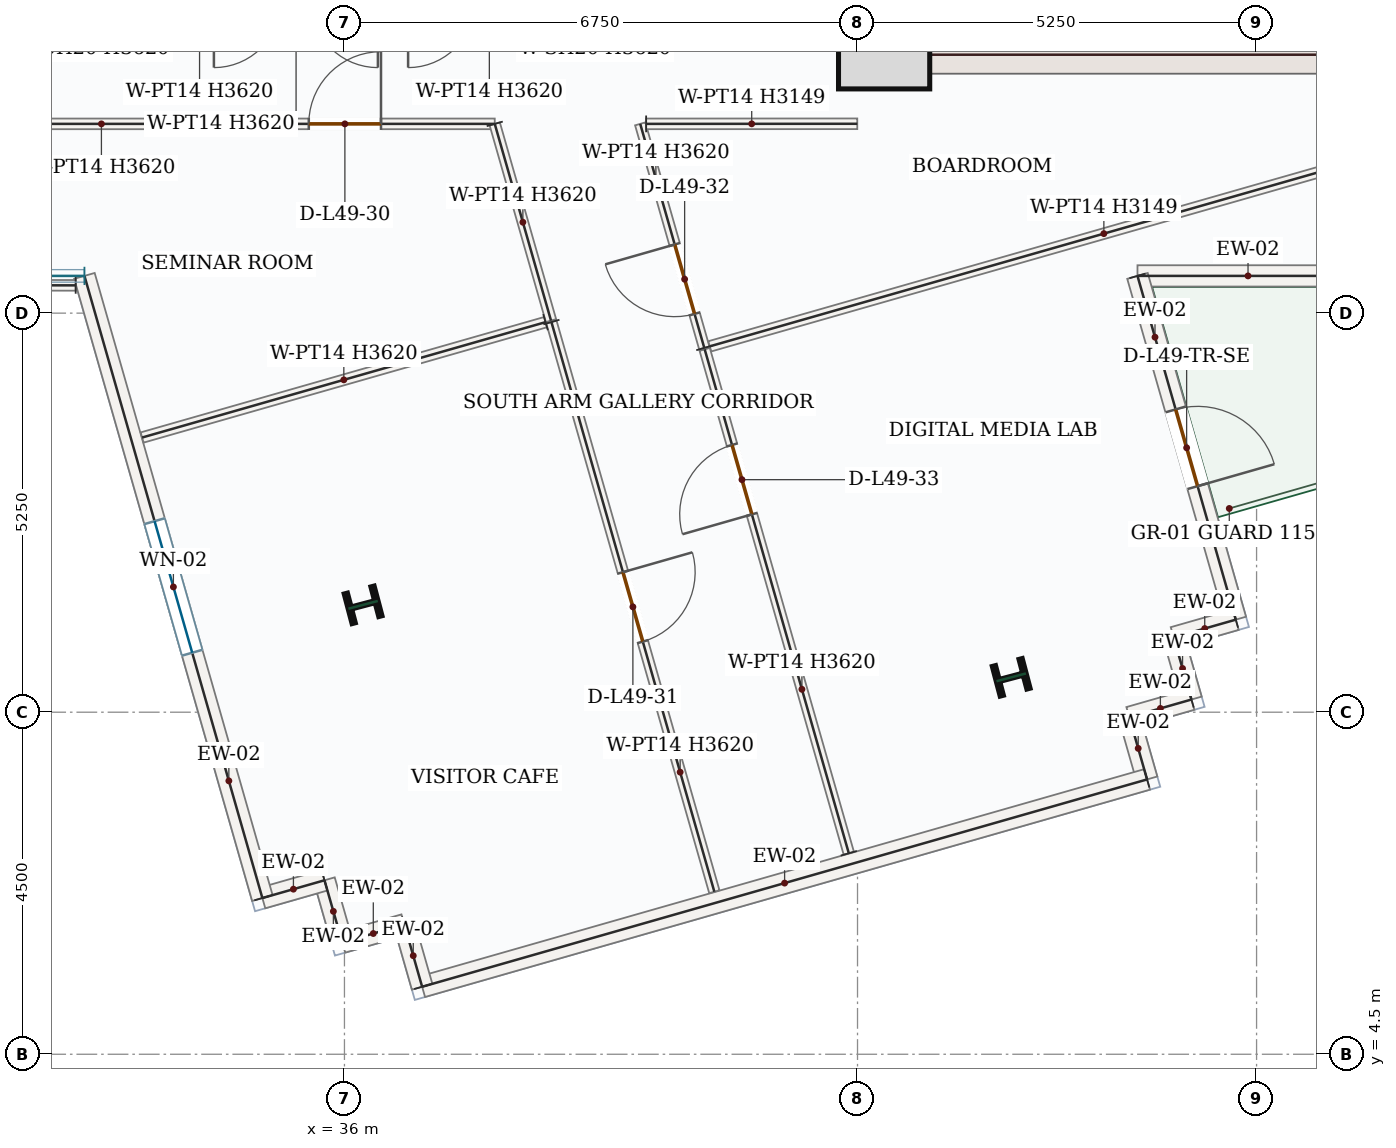
"""IFC4 building model, lengths in metres.
Left out: names, types, materials, properties, quantities, classifications, styles, units other than length and angle.
Written with IfcOpenShell. Run it as: python <this file> out.ifc"""

import sys

from ifc_helpers import new_model, si_unit, direction, frame, frame_2d, origin, origin_2d, place, context, subcontext, project, spatial, rectangle, i_section, extrude, source, transform, mapped, element, fill, save


model = new_model("IFC4")
c1 = context("Model", 3, precision=1e-05, world=origin(), true_north=direction((0.0, 1.0)))
c2 = subcontext(c1, "Body", "Model", "MODEL_VIEW")
j1 = project(units=[si_unit("LENGTHUNIT", "METRE"), si_unit("PLANEANGLEUNIT", "RADIAN")], contexts=[c1])
p1 = place(None, origin())
s1 = spatial("IfcSite", under=j1, at=p1, CompositionType="ELEMENT")
p2 = place(p1, origin())
s2 = spatial("IfcBuilding", under=s1, at=p2, CompositionType="ELEMENT")
p3 = place(p2, frame((0.0, 0.0, 209.7)))
s3 = spatial("IfcBuildingStorey", under=s2, at=p3, CompositionType="ELEMENT", Elevation=209.7)
p4 = place(p3, frame((43.0, 17.4, 0.0), z_axis=(0.0, 0.0, 1.0), x_axis=(0.0, 1.0, 0.0)))
e1 = element("IfcWall", 1, at=p4, inside=s3, PredefinedType="SHEAR", context=c2, shape_type="SweptSolid", body=[
    extrude(rectangle(XDim=8.55, YDim=0.5, at=frame_2d((4.275, 0.0))), origin(), (0.0, 0.0, 1.0), 3.62),
])
p5 = place(p4, frame((6.65, 0.0, 0.0)))
e2 = element("IfcOpeningElement", 2, at=p5, cuts=e1, PredefinedType="OPENING", context=c2, shape_type="SweptSolid", body=[
    extrude(rectangle(XDim=1.1, YDim=2.2, at=frame_2d((0.55, 1.1))), frame((0.0, 0.26, 0.0), z_axis=(0.0, -1.0, 0.0), x_axis=(1.0, 0.0, 0.0)), (0.0, 0.0, 1.0), 0.52),
])
p6 = place(p4, frame((1.75, 0.0, 0.0)))
e3 = element("IfcOpeningElement", 3, at=p6, cuts=e1, PredefinedType="OPENING", context=c2, shape_type="SweptSolid", body=[
    extrude(rectangle(XDim=1.3, YDim=2.2, at=frame_2d((0.65, 1.1))), frame((0.0, 0.26, 0.0), z_axis=(0.0, -1.0, 0.0), x_axis=(1.0, 0.0, 0.0)), (0.0, 0.0, 1.0), 0.52),
])
p7 = place(p4, frame((4.3, 0.0, 0.0)))
e4 = element("IfcOpeningElement", 4, at=p7, cuts=e1, PredefinedType="OPENING", context=c2, shape_type="SweptSolid", body=[
    extrude(rectangle(XDim=0.88, YDim=2.1, at=frame_2d((0.44, 1.05))), frame((0.0, 0.26, 0.0), z_axis=(0.0, -1.0, 0.0), x_axis=(1.0, 0.0, 0.0)), (0.0, 0.0, 1.0), 0.52),
])
m1 = source(origin(), c2, "Body", "SweptSolid", [
    extrude(rectangle(XDim=7.0, YDim=0.5, at=frame_2d((3.5, 0.0))), origin(), (0.0, 0.0, 1.0), 3.62),
])
p8 = place(p3, frame((43.25, 17.65, 0.0), z_axis=(0.0, 0.0, 1.0), x_axis=(1.0, 0.0, 0.0)))
e5 = element("IfcWall", 5, at=p8, inside=s3, PredefinedType="SHEAR", context=c2, shape_type="MappedRepresentation", body=[
    mapped(m1, transform((0.0, 0.0, 0.0), x_axis=(1.0, 0.0, 0.0), y_axis=(0.0, 1.0, 0.0), z_axis=(0.0, 0.0, 1.0), scale=1.0)),
])
m2 = source(origin(), c2, "Body", "SweptSolid", [
    extrude(rectangle(XDim=1.2, YDim=1.2, at=origin_2d()), origin(), (0.0, 0.0, 1.0), 3.9),
])
p9 = place(p3, frame((43.1, 17.8, 0.0), z_axis=(0.0, 0.0, 1.0), x_axis=(1.0, 0.0, 0.0)))
e6 = element("IfcColumn", 6, at=p9, inside=s3, PredefinedType="COLUMN", context=c2, shape_type="MappedRepresentation", body=[
    mapped(m2, transform((0.0, 0.0, 0.0), x_axis=(1.0, 0.0, 0.0), y_axis=(0.0, 1.0, 0.0), z_axis=(0.0, 0.0, 1.0), scale=1.0)),
])
m3 = source(origin(), c2, "Body", "SweptSolid", [
    extrude(i_section(OverallWidth=0.404, OverallDepth=0.407, WebThickness=0.027, FlangeThickness=0.044, FilletRadius=0.018, at=origin_2d()), origin(), (0.0, 0.0, 1.0), 3.9),
])
for number, where, z_axis, x_axis in (
    (7, (36.245, 10.412, 0.0), (0.0, 0.0, 1.0), (-0.255, 0.967, 0.0)),
    (8, (44.772, 9.459, 0.0), (0.0, 0.0, 1.0), (-0.255, 0.967, 0.0)),
):
    element("IfcColumn", number, at=place(p3, frame(where, z_axis=z_axis, x_axis=x_axis)), inside=s3, PredefinedType="COLUMN", context=c2, shape_type="MappedRepresentation", body=[
        mapped(m3, transform((0.0, 0.0, 0.0), x_axis=(1.0, 0.0, 0.0), y_axis=(0.0, 1.0, 0.0), z_axis=(0.0, 0.0, 1.0), scale=1.0)),
    ])
m4 = source(origin(), c2, "Body", "SweptSolid", [
    extrude(rectangle(XDim=2.909, YDim=0.28, at=frame_2d((1.455, 0.0))), origin(), (0.0, 0.0, 1.0), 3.62),
])
p10 = place(p3, frame((49.342, 14.74, 0.0), z_axis=(0.0, 0.0, 1.0), x_axis=(-1.0, 0.0, 0.0)))
e9 = element("IfcWall", 9, at=p10, inside=s3, PredefinedType="SOLIDWALL", context=c2, shape_type="MappedRepresentation", body=[
    mapped(m4, transform((0.0, 0.0, 0.0), x_axis=(1.0, 0.0, 0.0), y_axis=(0.0, 1.0, 0.0), z_axis=(0.0, 0.0, 1.0), scale=1.0)),
])
p11 = place(p3, frame((46.433, 14.74, 0.0), z_axis=(0.0, 0.0, 1.0), x_axis=(0.274981611661, -0.961449485542, 0.0)))
e10 = element("IfcWall", 10, at=p11, inside=s3, PredefinedType="SOLIDWALL", context=c2, shape_type="SweptSolid", body=[
    extrude(rectangle(XDim=4.704, YDim=0.28, at=frame_2d((2.352, 0.0))), origin(), (0.0, 0.0, 1.0), 3.62),
])
p12 = place(p11, frame((1.827, 0.0, 0.0)))
e11 = element("IfcOpeningElement", 11, at=p12, cuts=e10, PredefinedType="OPENING", context=c2, shape_type="SweptSolid", body=[
    extrude(rectangle(XDim=1.05, YDim=2.15, at=frame_2d((0.525, 1.075))), frame((0.0, 0.15, 0.0), z_axis=(0.0, -1.0, 0.0), x_axis=(1.0, 0.0, 0.0)), (0.0, 0.0, 1.0), 0.3),
])
m5 = source(origin(), c2, "Body", "SweptSolid", [
    extrude(rectangle(XDim=0.85, YDim=0.28, at=frame_2d((0.425, 0.0))), origin(), (0.0, 0.0, 1.0), 3.62),
])
p13 = place(p3, frame((47.727, 10.218, 0.0), z_axis=(0.0, 0.0, 1.0), x_axis=(-0.961469728335, -0.274910824624, 0.0)))
e12 = element("IfcWall", 12, at=p13, inside=s3, PredefinedType="SOLIDWALL", context=c2, shape_type="MappedRepresentation", body=[
    mapped(m5, transform((0.0, 0.0, 0.0), x_axis=(1.0, 0.0, 0.0), y_axis=(0.0, 1.0, 0.0), z_axis=(0.0, 0.0, 1.0), scale=1.0)),
])
m6 = source(origin(), c2, "Body", "SweptSolid", [
    extrude(rectangle(XDim=0.85, YDim=0.28, at=frame_2d((0.425, 0.0))), origin(), (0.0, 0.0, 1.0), 3.62),
])
p14 = place(p3, frame((46.909, 9.984, 0.0), z_axis=(0.0, 0.0, 1.0), x_axis=(0.274834915789, -0.961491429532, 0.0)))
e13 = element("IfcWall", 13, at=p14, inside=s3, PredefinedType="SOLIDWALL", context=c2, shape_type="MappedRepresentation", body=[
    mapped(m6, transform((0.0, 0.0, 0.0), x_axis=(1.0, 0.0, 0.0), y_axis=(0.0, 1.0, 0.0), z_axis=(0.0, 0.0, 1.0), scale=1.0)),
])
p15 = place(p3, frame((47.143, 9.167, 0.0), z_axis=(0.0, 0.0, 1.0), x_axis=(-0.961469728335, -0.274910824624, 0.0)))
e14 = element("IfcWall", 14, at=p15, inside=s3, PredefinedType="SOLIDWALL", context=c2, shape_type="MappedRepresentation", body=[
    mapped(m5, transform((0.0, 0.0, 0.0), x_axis=(1.0, 0.0, 0.0), y_axis=(0.0, 1.0, 0.0), z_axis=(0.0, 0.0, 1.0), scale=1.0)),
])
p16 = place(p3, frame((46.326, 8.933, 0.0), z_axis=(0.0, 0.0, 1.0), x_axis=(0.274834915789, -0.961491429532, 0.0)))
e15 = element("IfcWall", 15, at=p16, inside=s3, PredefinedType="SOLIDWALL", context=c2, shape_type="MappedRepresentation", body=[
    mapped(m6, transform((0.0, 0.0, 0.0), x_axis=(1.0, 0.0, 0.0), y_axis=(0.0, 1.0, 0.0), z_axis=(0.0, 0.0, 1.0), scale=1.0)),
])
m7 = source(origin(), c2, "Body", "SweptSolid", [
    extrude(rectangle(XDim=9.92, YDim=0.28, at=frame_2d((4.96, 0.0))), origin(), (0.0, 0.0, 1.0), 3.62),
])
p17 = place(p3, frame((46.56, 8.115, 0.0), z_axis=(0.0, 0.0, 1.0), x_axis=(-0.961457051276, -0.274955157346, 0.0)))
e16 = element("IfcWall", 16, at=p17, inside=s3, PredefinedType="SOLIDWALL", context=c2, shape_type="MappedRepresentation", body=[
    mapped(m7, transform((0.0, 0.0, 0.0), x_axis=(1.0, 0.0, 0.0), y_axis=(0.0, 1.0, 0.0), z_axis=(0.0, 0.0, 1.0), scale=1.0)),
])
for number, where, z_axis, x_axis in (
    (17, (37.022, 5.388, 0.0), (0.0, 0.0, 1.0), (-0.275, 0.961, 0.0)),
    (18, (36.788, 6.205, 0.0), (0.0, 0.0, 1.0), (-0.961, -0.275, 0.0)),
):
    element("IfcWall", number, at=place(p3, frame(where, z_axis=z_axis, x_axis=x_axis)), inside=s3, PredefinedType="SOLIDWALL", context=c2, shape_type="MappedRepresentation", body=[
        mapped(m5, transform((0.0, 0.0, 0.0), x_axis=(1.0, 0.0, 0.0), y_axis=(0.0, 1.0, 0.0), z_axis=(0.0, 0.0, 1.0), scale=1.0)),
    ])
p18 = place(p3, frame((35.971, 5.971, 0.0), z_axis=(0.0, 0.0, 1.0), x_axis=(-0.274834915789, 0.961491429532, 0.0)))
e19 = element("IfcWall", 19, at=p18, inside=s3, PredefinedType="SOLIDWALL", context=c2, shape_type="MappedRepresentation", body=[
    mapped(m6, transform((0.0, 0.0, 0.0), x_axis=(1.0, 0.0, 0.0), y_axis=(0.0, 1.0, 0.0), z_axis=(0.0, 0.0, 1.0), scale=1.0)),
])
p19 = place(p3, frame((35.737, 6.789, 0.0), z_axis=(0.0, 0.0, 1.0), x_axis=(-0.961393768724, -0.275176346112, 0.0)))
e20 = element("IfcWall", 20, at=p19, inside=s3, PredefinedType="SOLIDWALL", context=c2, shape_type="MappedRepresentation", body=[
    mapped(m5, transform((0.0, 0.0, 0.0), x_axis=(1.0, 0.0, 0.0), y_axis=(0.0, 1.0, 0.0), z_axis=(0.0, 0.0, 1.0), scale=1.0)),
])
p20 = place(p3, frame((34.92, 6.555, 0.0), z_axis=(0.0, 0.0, 1.0), x_axis=(-0.27496352843, 0.961454657295, 0.0)))
e21 = element("IfcWall", 21, at=p20, inside=s3, PredefinedType="SOLIDWALL", context=c2, shape_type="SweptSolid", body=[
    extrude(rectangle(XDim=8.513, YDim=0.28, at=frame_2d((4.257, 0.0))), origin(), (0.0, 0.0, 1.0), 3.62),
])
p21 = place(p20, frame((3.357, 0.0, 0.85)))
e22 = element("IfcOpeningElement", 22, at=p21, cuts=e21, PredefinedType="OPENING", context=c2, shape_type="SweptSolid", body=[
    extrude(rectangle(XDim=1.8, YDim=1.75, at=frame_2d((0.9, 0.875))), frame((0.0, 0.15, 0.0), z_axis=(0.0, -1.0, 0.0), x_axis=(1.0, 0.0, 0.0)), (0.0, 0.0, 1.0), 0.3),
])
p22 = place(p3, frame((40.734, 13.792, 0.0), z_axis=(0.0, 0.0, 1.0), x_axis=(-0.274984067599, 0.961448783122, 0.0)))
e23 = element("IfcWall", 23, at=p22, inside=s3, PredefinedType="PARTITIONING", context=c2, shape_type="SweptSolid", body=[
    extrude(rectangle(XDim=3.066, YDim=0.14, at=frame_2d((1.533, 0.0))), origin(), (0.0, 0.0, 1.0), 3.62),
])
p23 = place(p22, frame((0.465, 0.0, 0.0)))
e24 = element("IfcOpeningElement", 24, at=p23, cuts=e23, PredefinedType="OPENING", context=c2, shape_type="SweptSolid", body=[
    extrude(rectangle(XDim=0.95, YDim=2.15, at=frame_2d((0.475, 1.075))), frame((0.0, 0.08, 0.0), z_axis=(0.0, -1.0, 0.0), x_axis=(1.0, 0.0, 0.0)), (0.0, 0.0, 1.0), 0.16),
])
m8 = source(origin(), c2, "Body", "SweptSolid", [
    extrude(rectangle(XDim=2.778, YDim=0.14, at=frame_2d((1.389, 0.0))), origin(), (0.0, 0.0, 1.0), 3.149),
])
p24 = place(p3, frame((39.969, 16.74, 0.0), z_axis=(0.0, 0.0, 1.0), x_axis=(0.999999903427, 0.000439483125, 0.0)))
e25 = element("IfcWall", 25, at=p24, inside=s3, PredefinedType="PARTITIONING", context=c2, shape_type="MappedRepresentation", body=[
    mapped(m8, transform((0.0, 0.0, 0.0), x_axis=(1.0, 0.0, 0.0), y_axis=(0.0, 1.0, 0.0), z_axis=(0.0, 0.0, 1.0), scale=1.0)),
])
m9 = source(origin(), c2, "Body", "SweptSolid", [
    extrude(rectangle(XDim=10.785, YDim=0.14, at=frame_2d((5.393, 0.0))), origin(), (0.0, 0.0, 1.0), 3.149),
])
p25 = place(p3, frame((51.176, 16.779, 0.0), z_axis=(0.0, 0.0, 1.0), x_axis=(-0.961454726908, -0.274963285016, 0.0)))
e26 = element("IfcWall", 26, at=p25, inside=s3, PredefinedType="PARTITIONING", context=c2, shape_type="MappedRepresentation", body=[
    mapped(m9, transform((0.0, 0.0, 0.0), x_axis=(1.0, 0.0, 0.0), y_axis=(0.0, 1.0, 0.0), z_axis=(0.0, 0.0, 1.0), scale=1.0)),
])
p26 = place(p3, frame((30.225, 16.74, 0.0), z_axis=(0.0, 0.0, 1.0), x_axis=(1.0, 0.0, 0.0)))
e27 = element("IfcWall", 27, at=p26, inside=s3, PredefinedType="PARTITIONING", context=c2, shape_type="SweptSolid", body=[
    extrude(rectangle(XDim=7.753, YDim=0.14, at=frame_2d((3.876, 0.0))), origin(), (0.0, 0.0, 1.0), 3.62),
])
p27 = place(p26, frame((5.306, 0.0, 0.0)))
e28 = element("IfcOpeningElement", 28, at=p27, cuts=e27, PredefinedType="OPENING", context=c2, shape_type="SweptSolid", body=[
    extrude(rectangle(XDim=0.95, YDim=2.15, at=frame_2d((0.475, 1.075))), frame((0.0, 0.08, 0.0), z_axis=(0.0, -1.0, 0.0), x_axis=(1.0, 0.0, 0.0)), (0.0, 0.0, 1.0), 0.16),
])
m10 = source(origin(), c2, "Body", "SweptSolid", [
    extrude(rectangle(XDim=2.692, YDim=0.14, at=frame_2d((1.346, 0.0))), origin(), (0.0, 0.0, 1.0), 3.62),
])
p28 = place(p3, frame((37.977, 16.74, 0.0), z_axis=(0.0, 0.0, 1.0), x_axis=(0.27500862401, -0.961441759401, 0.0)))
e29 = element("IfcWall", 29, at=p28, inside=s3, PredefinedType="PARTITIONING", context=c2, shape_type="MappedRepresentation", body=[
    mapped(m10, transform((0.0, 0.0, 0.0), x_axis=(1.0, 0.0, 0.0), y_axis=(0.0, 1.0, 0.0), z_axis=(0.0, 0.0, 1.0), scale=1.0)),
])
m11 = source(origin(), c2, "Body", "SweptSolid", [
    extrude(rectangle(XDim=5.52, YDim=0.14, at=frame_2d((2.76, 0.0))), origin(), (0.0, 0.0, 1.0), 3.62),
])
p29 = place(p3, frame((38.646, 14.131, 0.0), z_axis=(0.0, 0.0, 1.0), x_axis=(-0.961455490798, -0.274960613933, 0.0)))
e30 = element("IfcWall", 30, at=p29, inside=s3, PredefinedType="PARTITIONING", context=c2, shape_type="MappedRepresentation", body=[
    mapped(m11, transform((0.0, 0.0, 0.0), x_axis=(1.0, 0.0, 0.0), y_axis=(0.0, 1.0, 0.0), z_axis=(0.0, 0.0, 1.0), scale=1.0)),
])
m12 = source(origin(), c2, "Body", "SweptSolid", [
    extrude(rectangle(XDim=3.385, YDim=0.14, at=frame_2d((1.693, 0.0))), origin(), (0.0, 0.0, 1.0), 3.62),
])
p30 = place(p3, frame((32.464, 14.615, 0.0), z_axis=(0.0, 0.0, 1.0), x_axis=(-0.999999061333, 0.001370158085, 0.0)))
e31 = element("IfcWall", 31, at=p30, inside=s3, PredefinedType="PARTITIONING", context=c2, shape_type="MappedRepresentation", body=[
    mapped(m12, transform((0.0, 0.0, 0.0), x_axis=(1.0, 0.0, 0.0), y_axis=(0.0, 1.0, 0.0), z_axis=(0.0, 0.0, 1.0), scale=1.0)),
])
p31 = place(p3, frame((42.635, 7.144, 0.0), z_axis=(0.0, 0.0, 1.0), x_axis=(-0.274973646468, 0.96145176361, 0.0)))
e32 = element("IfcWall", 32, at=p31, inside=s3, PredefinedType="PARTITIONING", context=c2, shape_type="SweptSolid", body=[
    extrude(rectangle(XDim=6.895, YDim=0.14, at=frame_2d((3.448, 0.0))), origin(), (0.0, 0.0, 1.0), 3.62),
])
p32 = place(p31, frame((4.637, 0.0, 0.0)))
e33 = element("IfcOpeningElement", 33, at=p32, cuts=e32, PredefinedType="OPENING", context=c2, shape_type="SweptSolid", body=[
    extrude(rectangle(XDim=0.95, YDim=2.15, at=frame_2d((0.475, 1.075))), frame((0.0, 0.08, 0.0), z_axis=(0.0, -1.0, 0.0), x_axis=(1.0, 0.0, 0.0)), (0.0, 0.0, 1.0), 0.16),
])
p33 = place(p3, frame((38.723, 14.133, 0.0), z_axis=(0.0, 0.0, 1.0), x_axis=(0.274985856522, -0.96144827147, 0.0)))
e34 = element("IfcWall", 34, at=p33, inside=s3, PredefinedType="PARTITIONING", context=c2, shape_type="SweptSolid", body=[
    extrude(rectangle(XDim=7.795, YDim=0.14, at=frame_2d((3.897, 0.0))), origin(), (0.0, 0.0, 1.0), 3.62),
])
p34 = place(p33, frame((3.423, 0.0, 0.0)))
e35 = element("IfcOpeningElement", 35, at=p34, cuts=e34, PredefinedType="OPENING", context=c2, shape_type="SweptSolid", body=[
    extrude(rectangle(XDim=0.95, YDim=2.15, at=frame_2d((0.475, 1.075))), frame((0.0, 0.08, 0.0), z_axis=(0.0, -1.0, 0.0), x_axis=(1.0, 0.0, 0.0)), (0.0, 0.0, 1.0), 0.16),
])
m13 = source(origin(), c2, "Body", "SweptSolid", [
    extrude(rectangle(XDim=1.05, YDim=2.15, at=frame_2d((0.525, 1.075))), frame((0.0, 0.025, 0.0), z_axis=(0.0, -1.0, 0.0), x_axis=(1.0, 0.0, 0.0)), (0.0, 0.0, 1.0), 0.05),
])
p35 = place(p12, origin())
e36 = element("IfcDoor", 36, at=p35, inside=s3, OperationType="SINGLE_SWING_RIGHT", PredefinedType="DOOR", context=c2, shape_type="MappedRepresentation", body=[
    mapped(m13, transform((0.0, 0.0, 0.0), x_axis=(1.0, 0.0, 0.0), y_axis=(0.0, 1.0, 0.0), z_axis=(0.0, 0.0, 1.0), scale=1.0)),
])
fill(e11, e36)
m14 = source(origin(), c2, "Body", "SweptSolid", [
    extrude(rectangle(XDim=1.8, YDim=1.75, at=frame_2d((0.9, 0.875))), frame((0.0, 0.03, 0.0), z_axis=(0.0, -1.0, 0.0), x_axis=(1.0, 0.0, 0.0)), (0.0, 0.0, 1.0), 0.06),
])
p36 = place(p21, origin())
e37 = element("IfcWindow", 37, at=p36, inside=s3, PartitioningType="DOUBLE_PANEL_VERTICAL", PredefinedType="WINDOW", context=c2, shape_type="MappedRepresentation", body=[
    mapped(m14, transform((0.0, 0.0, 0.0), x_axis=(1.0, 0.0, 0.0), y_axis=(0.0, 1.0, 0.0), z_axis=(0.0, 0.0, 1.0), scale=1.0)),
])
fill(e22, e37)
m15 = source(origin(), c2, "Body", "SweptSolid", [
    extrude(rectangle(XDim=0.95, YDim=2.15, at=frame_2d((0.475, 1.075))), frame((0.0, 0.025, 0.0), z_axis=(0.0, -1.0, 0.0), x_axis=(1.0, 0.0, 0.0)), (0.0, 0.0, 1.0), 0.05),
])
p37 = place(p27, origin())
e38 = element("IfcDoor", 38, at=p37, inside=s3, OperationType="SINGLE_SWING_RIGHT", PredefinedType="DOOR", context=c2, shape_type="MappedRepresentation", body=[
    mapped(m15, transform((0.0, 0.0, 0.0), x_axis=(1.0, 0.0, 0.0), y_axis=(0.0, 1.0, 0.0), z_axis=(0.0, 0.0, 1.0), scale=1.0)),
])
fill(e28, e38)
p38 = place(p34, origin())
e39 = element("IfcDoor", 39, at=p38, inside=s3, OperationType="SINGLE_SWING_LEFT", PredefinedType="DOOR", context=c2, shape_type="MappedRepresentation", body=[
    mapped(m15, transform((0.0, 0.0, 0.0), x_axis=(1.0, 0.0, 0.0), y_axis=(0.0, 1.0, 0.0), z_axis=(0.0, 0.0, 1.0), scale=1.0)),
])
fill(e35, e39)
p39 = place(p23, origin())
e40 = element("IfcDoor", 40, at=p39, inside=s3, OperationType="SINGLE_SWING_RIGHT", PredefinedType="DOOR", context=c2, shape_type="MappedRepresentation", body=[
    mapped(m15, transform((0.0, 0.0, 0.0), x_axis=(1.0, 0.0, 0.0), y_axis=(0.0, 1.0, 0.0), z_axis=(0.0, 0.0, 1.0), scale=1.0)),
])
fill(e24, e40)
p40 = place(p32, origin())
e41 = element("IfcDoor", 41, at=p40, inside=s3, OperationType="SINGLE_SWING_LEFT", PredefinedType="DOOR", context=c2, shape_type="MappedRepresentation", body=[
    mapped(m15, transform((0.0, 0.0, 0.0), x_axis=(1.0, 0.0, 0.0), y_axis=(0.0, 1.0, 0.0), z_axis=(0.0, 0.0, 1.0), scale=1.0)),
])
fill(e33, e41)
save(model, sys.argv[1])
